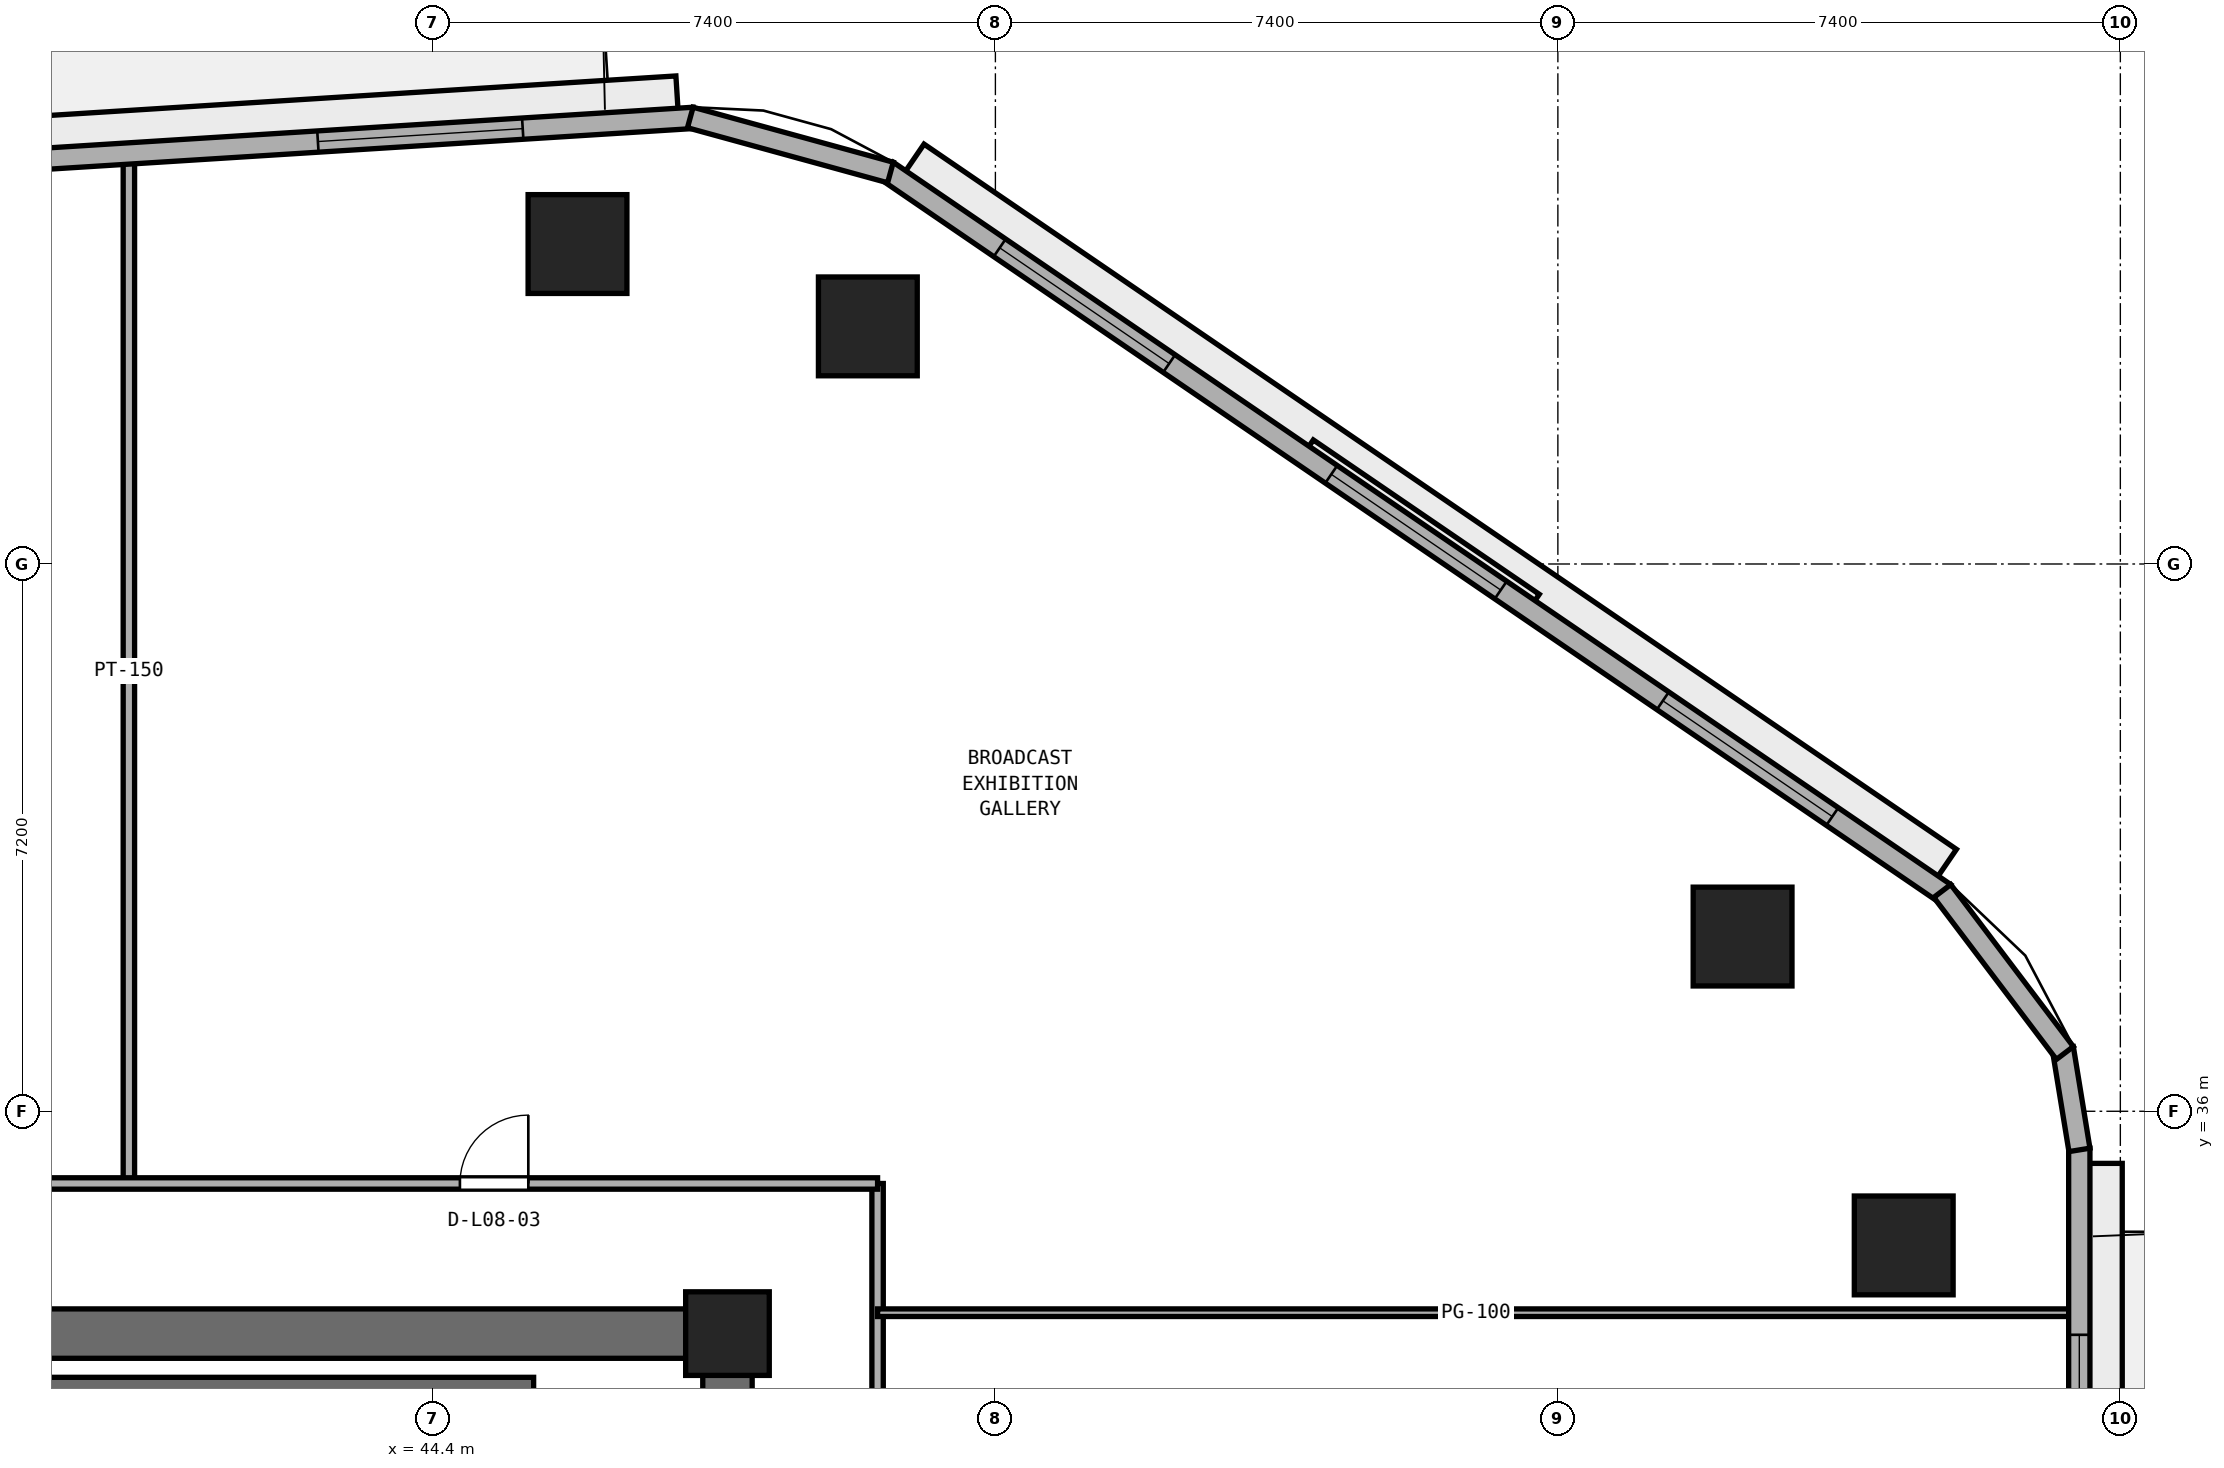
"""IFC4 building model, lengths in metres.
Left out: names, types, materials, properties, quantities, classifications, styles, units other than length and angle.
Written with IfcOpenShell. Run it as: python <this file> out.ifc"""

import sys

from ifc_helpers import new_model, si_unit, direction, frame, frame_2d, origin, origin_2d, place, context, subcontext, project, spatial, rectangle, extrude, element, fill, save


model = new_model("IFC4")
c1 = context("Model", 3, precision=1e-05, world=origin(), true_north=direction((0.0, 1.0)))
c2 = subcontext(c1, "Body", "Model", "MODEL_VIEW")
j1 = project(units=[si_unit("LENGTHUNIT", "METRE"), si_unit("PLANEANGLEUNIT", "RADIAN")], contexts=[c1])
p1 = place(None, origin())
s1 = spatial("IfcSite", under=j1, at=p1, CompositionType="ELEMENT")
p2 = place(p1, origin())
s2 = spatial("IfcBuilding", under=s1, at=p2, CompositionType="ELEMENT")
p3 = place(p2, frame((0.0, 0.0, 36.4)))
s3 = spatial("IfcBuildingStorey", under=s2, at=p3, CompositionType="ELEMENT", Elevation=36.4)
p4 = place(p3, frame((25.4, 33.075, 0.0), z_axis=(0.0, 0.0, 1.0), x_axis=(1.0, 0.0, 0.0)))
e1 = element("IfcWall", 1, at=p4, inside=s3, PredefinedType="SHEAR", context=c2, shape_type="SweptSolid", body=[
    extrude(rectangle(XDim=23.2, YDim=0.65, at=frame_2d((11.6, 0.0))), origin(), (0.0, 0.0, 1.0), 3.525),
])
p5 = place(p3, frame((48.275, 17.65, 0.0), z_axis=(0.0, 0.0, 1.0), x_axis=(0.0, 1.0, 0.0)))
e2 = element("IfcWall", 2, at=p5, inside=s3, PredefinedType="SHEAR", context=c2, shape_type="SweptSolid", body=[
    extrude(rectangle(XDim=15.1, YDim=0.65, at=frame_2d((7.55, 0.0))), origin(), (0.0, 0.0, 1.0), 3.525),
])
p6 = place(p5, frame((5.65, 0.0, 0.0)))
e3 = element("IfcOpeningElement", 3, at=p6, cuts=e2, PredefinedType="OPENING", context=c2, shape_type="SweptSolid", body=[
    extrude(rectangle(XDim=1.5, YDim=2.15, at=frame_2d((0.75, 1.075))), frame((0.0, 0.335, 0.0), z_axis=(0.0, -1.0, 0.0), x_axis=(1.0, 0.0, 0.0)), (0.0, 0.0, 1.0), 0.67),
])
p7 = place(p3, frame((48.275, 33.075, 0.0), z_axis=(0.0, 0.0, 1.0), x_axis=(1.0, 0.0, 0.0)))
e4 = element("IfcColumn", 4, at=p7, inside=s3, PredefinedType="PILASTER", context=c2, shape_type="SweptSolid", body=[
    extrude(rectangle(XDim=1.1, YDim=1.1, at=origin_2d()), origin(), (0.0, 0.0, 1.0), 3.8),
])
for number, where, z_axis, x_axis in (
    (5, (63.75, 34.235, 0.0), (0.0, 0.0, 1.0), (1.0, 0.0, 0.0)),
    (6, (61.63, 38.299, 0.0), (0.0, 0.0, 1.0), (1.0, 0.0, 0.0)),
    (7, (50.122, 46.326, 0.0), (0.0, 0.0, 1.0), (1.0, 0.0, 0.0)),
    (8, (46.302, 47.409, 0.0), (0.0, 0.0, 1.0), (1.0, 0.0, 0.0)),
):
    element("IfcColumn", number, at=place(p3, frame(where, z_axis=z_axis, x_axis=x_axis)), inside=s3, PredefinedType="COLUMN", context=c2, shape_type="SweptSolid", body=[
        extrude(rectangle(XDim=1.3, YDim=1.3, at=origin_2d()), origin(), (0.0, 0.0, 1.0), 3.8),
    ])
p8 = place(p3, frame((38.425, 32.375, 0.0), z_axis=(0.0, 0.0, 1.0), x_axis=(1.0, 0.0, 0.0)))
e9 = element("IfcWall", 9, at=p8, inside=s3, PredefinedType="SHEAR", context=c2, shape_type="SweptSolid", body=[
    extrude(rectangle(XDim=7.3, YDim=0.25, at=frame_2d((3.65, 0.0))), origin(), (0.0, 0.0, 1.0), 3.525),
])
p9 = place(p3, frame((50.25, 15.35, 0.0), z_axis=(0.0, 0.0, 1.0), x_axis=(0.0, 1.0, 0.0)))
e10 = element("IfcWall", 10, at=p9, inside=s3, PredefinedType="PARTITIONING", context=c2, shape_type="SweptSolid", body=[
    extrude(rectangle(XDim=19.7, YDim=0.15, at=frame_2d((9.85, 0.0))), origin(), (0.0, 0.0, 1.0), 3.525),
])
p10 = place(p9, frame((9.4, 0.0, 0.0)))
e11 = element("IfcOpeningElement", 11, at=p10, cuts=e10, PredefinedType="OPENING", context=c2, shape_type="SweptSolid", body=[
    extrude(rectangle(XDim=0.9, YDim=2.1, at=frame_2d((0.45, 1.05))), frame((0.0, 0.085, 0.0), z_axis=(0.0, -1.0, 0.0), x_axis=(1.0, 0.0, 0.0)), (0.0, 0.0, 1.0), 0.17),
])
p11 = place(p3, frame((40.4, 35.05, 0.0), z_axis=(0.0, 0.0, 1.0), x_axis=(0.0, 1.0, 0.0)))
e12 = element("IfcWall", 12, at=p11, inside=s3, PredefinedType="PARTITIONING", context=c2, shape_type="SweptSolid", body=[
    extrude(rectangle(XDim=13.486, YDim=0.15, at=frame_2d((6.743, 0.0))), origin(), (0.0, 0.0, 1.0), 3.525),
])
p12 = place(p3, frame((50.25, 33.35, 0.0), z_axis=(0.0, 0.0, 1.0), x_axis=(1.0, 0.0, 0.0)))
e13 = element("IfcWall", 13, at=p12, inside=s3, PredefinedType="PARTITIONING", context=c2, shape_type="SweptSolid", body=[
    extrude(rectangle(XDim=15.745, YDim=0.1, at=frame_2d((7.873, 0.0))), origin(), (0.0, 0.0, 1.0), 2.908),
])
p13 = place(p3, frame((23.75, 35.05, 0.0), z_axis=(0.0, 0.0, 1.0), x_axis=(1.0, 0.0, 0.0)))
e14 = element("IfcWall", 14, at=p13, inside=s3, PredefinedType="PARTITIONING", context=c2, shape_type="SweptSolid", body=[
    extrude(rectangle(XDim=26.5, YDim=0.15, at=frame_2d((13.25, 0.0))), origin(), (0.0, 0.0, 1.0), 3.525),
])
p14 = place(p13, frame((2.195, 0.0, 0.0)))
e15 = element("IfcOpeningElement", 15, at=p14, cuts=e14, PredefinedType="OPENING", context=c2, shape_type="SweptSolid", body=[
    extrude(rectangle(XDim=1.0, YDim=2.12, at=frame_2d((0.5, 1.06))), frame((0.0, 0.085, 0.0), z_axis=(0.0, -1.0, 0.0), x_axis=(1.0, 0.0, 0.0)), (0.0, 0.0, 1.0), 0.17),
])
p15 = place(p13, frame((10.4, 0.0, 0.0)))
e16 = element("IfcOpeningElement", 16, at=p15, cuts=e14, PredefinedType="OPENING", context=c2, shape_type="SweptSolid", body=[
    extrude(rectangle(XDim=1.0, YDim=2.12, at=frame_2d((0.5, 1.06))), frame((0.0, 0.085, 0.0), z_axis=(0.0, -1.0, 0.0), x_axis=(1.0, 0.0, 0.0)), (0.0, 0.0, 1.0), 0.17),
])
p16 = place(p13, frame((21.005, 0.0, 0.0)))
e17 = element("IfcOpeningElement", 17, at=p16, cuts=e14, PredefinedType="OPENING", context=c2, shape_type="SweptSolid", body=[
    extrude(rectangle(XDim=0.9, YDim=2.1, at=frame_2d((0.45, 1.05))), frame((0.0, 0.085, 0.0), z_axis=(0.0, -1.0, 0.0), x_axis=(1.0, 0.0, 0.0)), (0.0, 0.0, 1.0), 0.17),
])
p17 = place(p3, frame((66.06, 16.183, 0.0), z_axis=(0.0, 0.0, 1.0), x_axis=(0.0, 1.0, 0.0)))
e18 = element("IfcWall", 18, at=p17, inside=s3, PredefinedType="STANDARD", context=c2, shape_type="SweptSolid", body=[
    extrude(rectangle(XDim=19.331, YDim=0.28, at=frame_2d((9.666, 0.0))), origin(), (0.0, 0.0, 1.0), 3.525),
])
p18 = place(p17, frame((9.115, 0.0, 0.0)))
e19 = element("IfcOpeningElement", 19, at=p18, cuts=e18, PredefinedType="OPENING", context=c2, shape_type="SweptSolid", body=[
    extrude(rectangle(XDim=1.1, YDim=2.2, at=frame_2d((0.55, 1.1))), frame((0.0, 0.15, 0.0), z_axis=(0.0, -1.0, 0.0), x_axis=(1.0, 0.0, 0.0)), (0.0, 0.0, 1.0), 0.3),
])
p19 = place(p17, frame((2.205, 0.0, 0.9)))
e20 = element("IfcOpeningElement", 20, at=p19, cuts=e18, PredefinedType="OPENING", context=c2, shape_type="SweptSolid", body=[
    extrude(rectangle(XDim=2.7, YDim=1.75, at=frame_2d((1.35, 0.875))), frame((0.0, 0.15, 0.0), z_axis=(0.0, -1.0, 0.0), x_axis=(1.0, 0.0, 0.0)), (0.0, 0.0, 1.0), 0.3),
])
p20 = place(p17, frame((14.176, 0.0, 0.9)))
e21 = element("IfcOpeningElement", 21, at=p20, cuts=e18, PredefinedType="OPENING", context=c2, shape_type="SweptSolid", body=[
    extrude(rectangle(XDim=2.7, YDim=1.75, at=frame_2d((1.35, 0.875))), frame((0.0, 0.15, 0.0), z_axis=(0.0, -1.0, 0.0), x_axis=(1.0, 0.0, 0.0)), (0.0, 0.0, 1.0), 0.3),
])
p21 = place(p3, frame((64.29, 38.867, 0.0), z_axis=(0.0, 0.0, 1.0), x_axis=(-0.825755550159, 0.564028165416, 0.0)))
e22 = element("IfcWall", 22, at=p21, inside=s3, PredefinedType="STANDARD", context=c2, shape_type="SweptSolid", body=[
    extrude(rectangle(XDim=16.848, YDim=0.28, at=frame_2d((8.424, 0.0))), origin(), (0.0, 0.0, 1.0), 3.525),
])
p22 = place(p21, frame((1.792, 0.0, 0.9)))
e23 = element("IfcOpeningElement", 23, at=p22, cuts=e22, PredefinedType="OPENING", context=c2, shape_type="SweptSolid", body=[
    extrude(rectangle(XDim=2.7, YDim=1.75, at=frame_2d((1.35, 0.875))), frame((0.0, 0.15, 0.0), z_axis=(0.0, -1.0, 0.0), x_axis=(1.0, 0.0, 0.0)), (0.0, 0.0, 1.0), 0.3),
])
p23 = place(p21, frame((7.074, 0.0, 0.9)))
e24 = element("IfcOpeningElement", 24, at=p23, cuts=e22, PredefinedType="OPENING", context=c2, shape_type="SweptSolid", body=[
    extrude(rectangle(XDim=2.7, YDim=1.75, at=frame_2d((1.35, 0.875))), frame((0.0, 0.15, 0.0), z_axis=(0.0, -1.0, 0.0), x_axis=(1.0, 0.0, 0.0)), (0.0, 0.0, 1.0), 0.3),
])
p24 = place(p21, frame((12.357, 0.0, 0.9)))
e25 = element("IfcOpeningElement", 25, at=p24, cuts=e22, PredefinedType="OPENING", context=c2, shape_type="SweptSolid", body=[
    extrude(rectangle(XDim=2.7, YDim=1.75, at=frame_2d((1.35, 0.875))), frame((0.0, 0.15, 0.0), z_axis=(0.0, -1.0, 0.0), x_axis=(1.0, 0.0, 0.0)), (0.0, 0.0, 1.0), 0.3),
])
p25 = place(p3, frame((47.832, 49.069, 0.0), z_axis=(0.0, 0.0, 1.0), x_axis=(-0.998017725054, -0.062933460723, 0.0)))
e26 = element("IfcWall", 26, at=p25, inside=s3, PredefinedType="STANDARD", context=c2, shape_type="SweptSolid", body=[
    extrude(rectangle(XDim=19.629, YDim=0.28, at=frame_2d((9.815, 0.0))), origin(), (0.0, 0.0, 1.0), 3.525),
])
p26 = place(p25, frame((9.265, 0.0, 0.0)))
e27 = element("IfcOpeningElement", 27, at=p26, cuts=e26, PredefinedType="OPENING", context=c2, shape_type="SweptSolid", body=[
    extrude(rectangle(XDim=1.1, YDim=2.2, at=frame_2d((0.55, 1.1))), frame((0.0, 0.15, 0.0), z_axis=(0.0, -1.0, 0.0), x_axis=(1.0, 0.0, 0.0)), (0.0, 0.0, 1.0), 0.3),
])
p27 = place(p25, frame((2.255, 0.0, 0.9)))
e28 = element("IfcOpeningElement", 28, at=p27, cuts=e26, PredefinedType="OPENING", context=c2, shape_type="SweptSolid", body=[
    extrude(rectangle(XDim=2.7, YDim=1.75, at=frame_2d((1.35, 0.875))), frame((0.0, 0.15, 0.0), z_axis=(0.0, -1.0, 0.0), x_axis=(1.0, 0.0, 0.0)), (0.0, 0.0, 1.0), 0.3),
])
p28 = place(p25, frame((14.675, 0.0, 0.9)))
e29 = element("IfcOpeningElement", 29, at=p28, cuts=e26, PredefinedType="OPENING", context=c2, shape_type="SweptSolid", body=[
    extrude(rectangle(XDim=2.7, YDim=1.75, at=frame_2d((1.35, 0.875))), frame((0.0, 0.15, 0.0), z_axis=(0.0, -1.0, 0.0), x_axis=(1.0, 0.0, 0.0)), (0.0, 0.0, 1.0), 0.3),
])
p29 = place(p3, frame((66.062, 35.492, 0.0), z_axis=(0.0, 0.0, 1.0), x_axis=(-0.161182073582, 0.986924687682, 0.0)))
e30 = element("IfcWall", 30, at=p29, inside=s3, PredefinedType="STANDARD", context=c2, shape_type="SweptSolid", body=[
    extrude(rectangle(XDim=1.354, YDim=0.28, at=frame_2d((0.677, 0.0))), origin(), (0.0, 0.0, 1.0), 3.525),
])
p30 = place(p3, frame((65.87, 36.767, 0.0), z_axis=(0.0, 0.0, 1.0), x_axis=(-0.603370463754, 0.797461023166, 0.0)))
e31 = element("IfcWall", 31, at=p30, inside=s3, PredefinedType="STANDARD", context=c2, shape_type="SweptSolid", body=[
    extrude(rectangle(XDim=2.673, YDim=0.28, at=frame_2d((1.336, 0.0))), origin(), (0.0, 0.0, 1.0), 3.525),
])
p31 = place(p3, frame((50.419, 48.351, 0.0), z_axis=(0.0, 0.0, 1.0), x_axis=(-0.964254516967, 0.264977784933, 0.0)))
e32 = element("IfcWall", 32, at=p31, inside=s3, PredefinedType="STANDARD", context=c2, shape_type="SweptSolid", body=[
    extrude(rectangle(XDim=2.731, YDim=0.28, at=frame_2d((1.365, 0.0))), origin(), (0.0, 0.0, 1.0), 3.525),
])
p32 = place(p16, origin())
e33 = element("IfcDoor", 33, at=p32, inside=s3, OperationType="SINGLE_SWING_RIGHT", PredefinedType="DOOR", context=c2, shape_type="SweptSolid", body=[
    extrude(rectangle(XDim=0.9, YDim=2.1, at=frame_2d((0.45, 1.05))), frame((0.0, 0.025, 0.0), z_axis=(0.0, -1.0, 0.0), x_axis=(1.0, 0.0, 0.0)), (0.0, 0.0, 1.0), 0.05),
])
fill(e17, e33)
p33 = place(p20, origin())
e34 = element("IfcWindow", 34, at=p33, inside=s3, PartitioningType="SINGLE_PANEL", PredefinedType="WINDOW", context=c2, shape_type="SweptSolid", body=[
    extrude(rectangle(XDim=2.7, YDim=1.75, at=frame_2d((1.35, 0.875))), frame((0.0, 0.03, 0.0), z_axis=(0.0, -1.0, 0.0), x_axis=(1.0, 0.0, 0.0)), (0.0, 0.0, 1.0), 0.06),
])
fill(e21, e34)
p34 = place(p22, origin())
e35 = element("IfcWindow", 35, at=p34, inside=s3, PartitioningType="SINGLE_PANEL", PredefinedType="WINDOW", context=c2, shape_type="SweptSolid", body=[
    extrude(rectangle(XDim=2.7, YDim=1.75, at=frame_2d((1.35, 0.875))), frame((0.0, 0.03, 0.0), z_axis=(0.0, -1.0, 0.0), x_axis=(1.0, 0.0, 0.0)), (0.0, 0.0, 1.0), 0.06),
])
fill(e23, e35)
p35 = place(p23, origin())
e36 = element("IfcWindow", 36, at=p35, inside=s3, PartitioningType="SINGLE_PANEL", PredefinedType="WINDOW", context=c2, shape_type="SweptSolid", body=[
    extrude(rectangle(XDim=2.7, YDim=1.75, at=frame_2d((1.35, 0.875))), frame((0.0, 0.03, 0.0), z_axis=(0.0, -1.0, 0.0), x_axis=(1.0, 0.0, 0.0)), (0.0, 0.0, 1.0), 0.06),
])
fill(e24, e36)
p36 = place(p24, origin())
e37 = element("IfcWindow", 37, at=p36, inside=s3, PartitioningType="SINGLE_PANEL", PredefinedType="WINDOW", context=c2, shape_type="SweptSolid", body=[
    extrude(rectangle(XDim=2.7, YDim=1.75, at=frame_2d((1.35, 0.875))), frame((0.0, 0.03, 0.0), z_axis=(0.0, -1.0, 0.0), x_axis=(1.0, 0.0, 0.0)), (0.0, 0.0, 1.0), 0.06),
])
fill(e25, e37)
p37 = place(p27, origin())
e38 = element("IfcWindow", 38, at=p37, inside=s3, PartitioningType="SINGLE_PANEL", PredefinedType="WINDOW", context=c2, shape_type="SweptSolid", body=[
    extrude(rectangle(XDim=2.7, YDim=1.75, at=frame_2d((1.35, 0.875))), frame((0.0, 0.03, 0.0), z_axis=(0.0, -1.0, 0.0), x_axis=(1.0, 0.0, 0.0)), (0.0, 0.0, 1.0), 0.06),
])
fill(e28, e38)
save(model, sys.argv[1])
